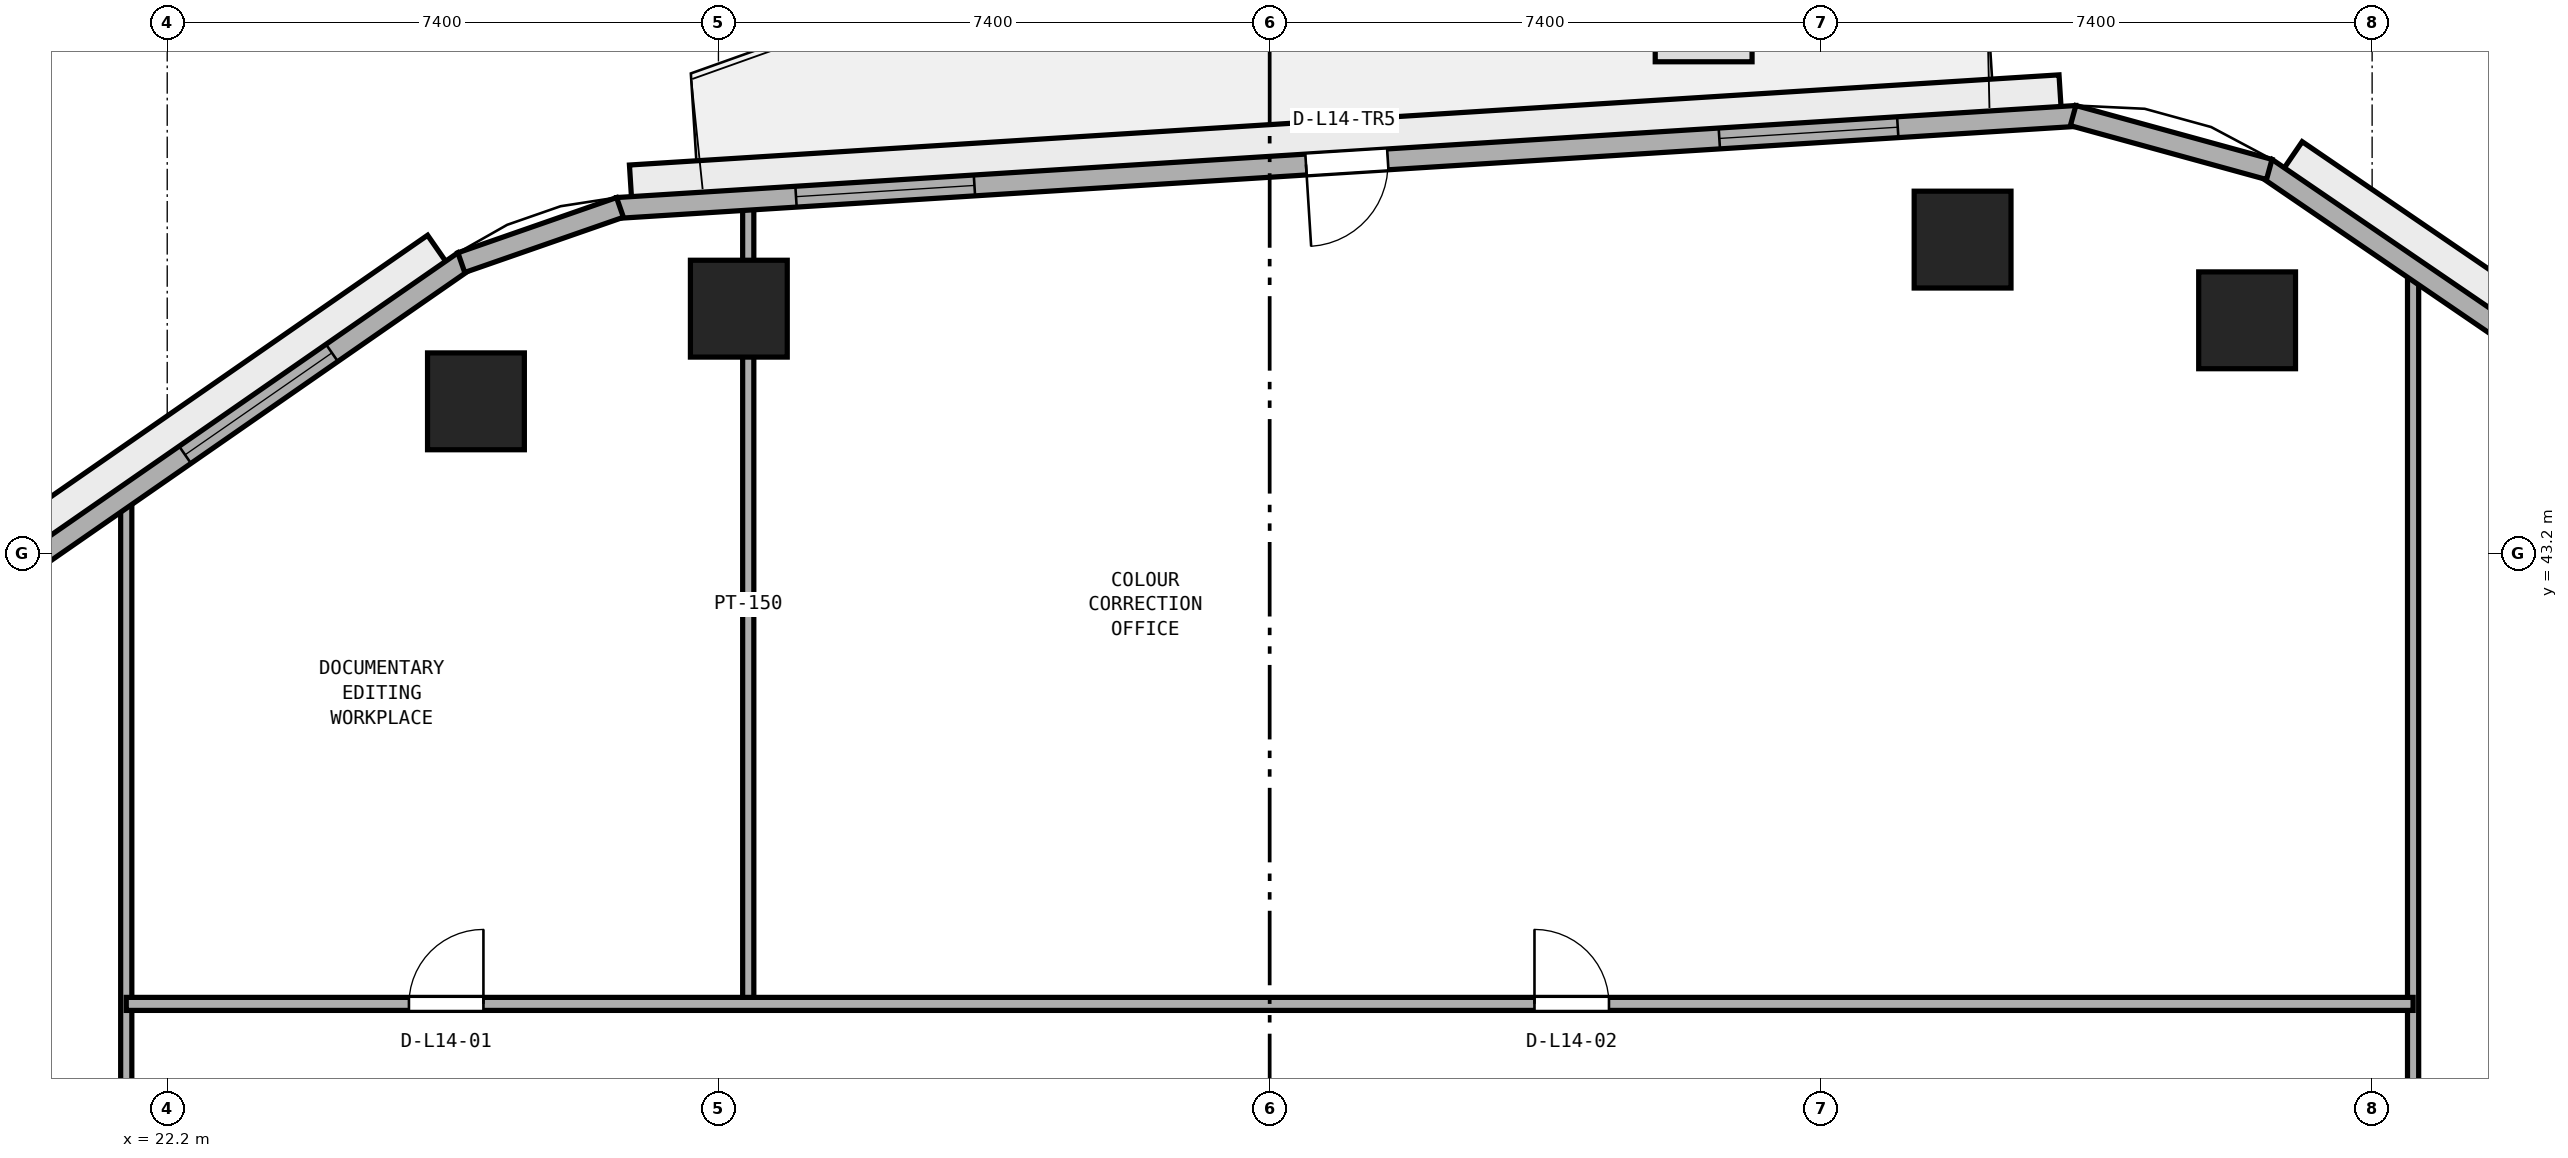
"""IFC4 building model, lengths in metres.
Left out: names, types, materials, properties, quantities, classifications, styles, units other than length and angle.
Written with IfcOpenShell. Run it as: python <this file> out.ifc"""

import sys

from ifc_helpers import new_model, si_unit, direction, frame, frame_2d, origin, origin_2d, place, context, subcontext, project, spatial, rectangle, extrude, element, fill, save


model = new_model("IFC4")
c1 = context("Model", 3, precision=1e-05, world=origin(), true_north=direction((0.0, 1.0)))
c2 = subcontext(c1, "Body", "Model", "MODEL_VIEW")
j1 = project(units=[si_unit("LENGTHUNIT", "METRE"), si_unit("PLANEANGLEUNIT", "RADIAN")], contexts=[c1])
p1 = place(None, origin())
s1 = spatial("IfcSite", under=j1, at=p1, CompositionType="ELEMENT")
p2 = place(p1, origin())
s2 = spatial("IfcBuilding", under=s1, at=p2, CompositionType="ELEMENT")
p3 = place(p2, frame((0.0, 0.0, 59.2)))
s3 = spatial("IfcBuildingStorey", under=s2, at=p3, CompositionType="ELEMENT", Elevation=59.2)
for number, where, z_axis, x_axis in (
    (1, (50.122, 46.326, 0.0), (0.0, 0.0, 1.0), (1.0, 0.0, 0.0)),
    (2, (46.302, 47.409, 0.0), (0.0, 0.0, 1.0), (1.0, 0.0, 0.0)),
    (3, (29.874, 46.482, 0.0), (0.0, 0.0, 1.0), (1.0, 0.0, 0.0)),
    (4, (26.344, 45.238, 0.0), (0.0, 0.0, 1.0), (1.0, 0.0, 0.0)),
):
    element("IfcColumn", number, at=place(p3, frame(where, z_axis=z_axis, x_axis=x_axis)), inside=s3, PredefinedType="COLUMN", context=c2, shape_type="SweptSolid", body=[
        extrude(rectangle(XDim=1.3, YDim=1.3, at=origin_2d()), origin(), (0.0, 0.0, 1.0), 3.8),
    ])
p4 = place(p3, frame((52.35, 3.611, 0.0), z_axis=(0.0, 0.0, 1.0), x_axis=(0.0, 1.0, 0.0)))
e5 = element("IfcWall", 5, at=p4, inside=s3, PredefinedType="PARTITIONING", context=c2, shape_type="SweptSolid", body=[
    extrude(rectangle(XDim=43.441, YDim=0.15, at=frame_2d((21.72, 0.0))), origin(), (0.0, 0.0, 1.0), 3.525),
])
p5 = place(p4, frame((12.364, 0.0, 0.0)))
e6 = element("IfcOpeningElement", 6, at=p5, cuts=e5, PredefinedType="OPENING", context=c2, shape_type="SweptSolid", body=[
    extrude(rectangle(XDim=0.9, YDim=2.1, at=frame_2d((0.45, 1.05))), frame((0.0, 0.085, 0.0), z_axis=(0.0, -1.0, 0.0), x_axis=(1.0, 0.0, 0.0)), (0.0, 0.0, 1.0), 0.17),
])
p6 = place(p4, frame((18.889, 0.0, 0.0)))
e7 = element("IfcOpeningElement", 7, at=p6, cuts=e5, PredefinedType="OPENING", context=c2, shape_type="SweptSolid", body=[
    extrude(rectangle(XDim=1.0, YDim=2.12, at=frame_2d((0.5, 1.06))), frame((0.0, 0.085, 0.0), z_axis=(0.0, -1.0, 0.0), x_axis=(1.0, 0.0, 0.0)), (0.0, 0.0, 1.0), 0.17),
])
p7 = place(p4, frame((25.689, 0.0, 0.0)))
e8 = element("IfcOpeningElement", 8, at=p7, cuts=e5, PredefinedType="OPENING", context=c2, shape_type="SweptSolid", body=[
    extrude(rectangle(XDim=1.0, YDim=2.12, at=frame_2d((0.5, 1.06))), frame((0.0, 0.085, 0.0), z_axis=(0.0, -1.0, 0.0), x_axis=(1.0, 0.0, 0.0)), (0.0, 0.0, 1.0), 0.17),
])
p8 = place(p4, frame((31.114, 0.0, 0.0)))
e9 = element("IfcOpeningElement", 9, at=p8, cuts=e5, PredefinedType="OPENING", context=c2, shape_type="SweptSolid", body=[
    extrude(rectangle(XDim=0.9, YDim=2.1, at=frame_2d((0.45, 1.05))), frame((0.0, 0.085, 0.0), z_axis=(0.0, -1.0, 0.0), x_axis=(1.0, 0.0, 0.0)), (0.0, 0.0, 1.0), 0.17),
])
p9 = place(p3, frame((30.0, 37.15, 0.0), z_axis=(0.0, 0.0, 1.0), x_axis=(0.0, 1.0, 0.0)))
e10 = element("IfcWall", 10, at=p9, inside=s3, PredefinedType="PARTITIONING", context=c2, shape_type="SweptSolid", body=[
    extrude(rectangle(XDim=10.73, YDim=0.15, at=frame_2d((5.365, 0.0))), origin(), (0.0, 0.0, 1.0), 2.908),
])
p10 = place(p3, frame((21.65, 6.119, 0.0), z_axis=(0.0, 0.0, 1.0), x_axis=(0.0, 1.0, 0.0)))
e11 = element("IfcWall", 11, at=p10, inside=s3, PredefinedType="PARTITIONING", context=c2, shape_type="SweptSolid", body=[
    extrude(rectangle(XDim=37.884, YDim=0.15, at=frame_2d((18.942, 0.0))), origin(), (0.0, 0.0, 1.0), 3.525),
])
p11 = place(p10, frame((13.556, 0.0, 0.0)))
e12 = element("IfcOpeningElement", 12, at=p11, cuts=e11, PredefinedType="OPENING", context=c2, shape_type="SweptSolid", body=[
    extrude(rectangle(XDim=0.9, YDim=2.1, at=frame_2d((0.45, 1.05))), frame((0.0, 0.085, 0.0), z_axis=(0.0, -1.0, 0.0), x_axis=(1.0, 0.0, 0.0)), (0.0, 0.0, 1.0), 0.17),
])
p12 = place(p10, frame((25.506, 0.0, 0.0)))
e13 = element("IfcOpeningElement", 13, at=p12, cuts=e11, PredefinedType="OPENING", context=c2, shape_type="SweptSolid", body=[
    extrude(rectangle(XDim=0.9, YDim=2.1, at=frame_2d((0.45, 1.05))), frame((0.0, 0.085, 0.0), z_axis=(0.0, -1.0, 0.0), x_axis=(1.0, 0.0, 0.0)), (0.0, 0.0, 1.0), 0.17),
])
p13 = place(p3, frame((21.65, 37.15, 0.0), z_axis=(0.0, 0.0, 1.0), x_axis=(1.0, 0.0, 0.0)))
e14 = element("IfcWall", 14, at=p13, inside=s3, PredefinedType="PARTITIONING", context=c2, shape_type="SweptSolid", body=[
    extrude(rectangle(XDim=30.7, YDim=0.175, at=frame_2d((15.35, 0.0))), origin(), (0.0, 0.0, 1.0), 3.525),
])
p14 = place(p13, frame((3.795, 0.0, 0.0)))
e15 = element("IfcOpeningElement", 15, at=p14, cuts=e14, PredefinedType="OPENING", context=c2, shape_type="SweptSolid", body=[
    extrude(rectangle(XDim=1.0, YDim=2.12, at=frame_2d((0.5, 1.06))), frame((0.0, 0.097, 0.0), z_axis=(0.0, -1.0, 0.0), x_axis=(1.0, 0.0, 0.0)), (0.0, 0.0, 1.0), 0.195),
])
p15 = place(p13, frame((18.905, 0.0, 0.0)))
e16 = element("IfcOpeningElement", 16, at=p15, cuts=e14, PredefinedType="OPENING", context=c2, shape_type="SweptSolid", body=[
    extrude(rectangle(XDim=1.0, YDim=2.12, at=frame_2d((0.5, 1.06))), frame((0.0, 0.097, 0.0), z_axis=(0.0, -1.0, 0.0), x_axis=(1.0, 0.0, 0.0)), (0.0, 0.0, 1.0), 0.195),
])
p16 = place(p3, frame((64.29, 38.867, 0.0), z_axis=(0.0, 0.0, 1.0), x_axis=(-0.825755550159, 0.564028165416, 0.0)))
e17 = element("IfcWall", 17, at=p16, inside=s3, PredefinedType="STANDARD", context=c2, shape_type="SweptSolid", body=[
    extrude(rectangle(XDim=16.848, YDim=0.28, at=frame_2d((8.424, 0.0))), origin(), (0.0, 0.0, 1.0), 3.525),
])
p17 = place(p16, frame((1.941, 0.0, 0.9)))
e18 = element("IfcOpeningElement", 18, at=p17, cuts=e17, PredefinedType="OPENING", context=c2, shape_type="SweptSolid", body=[
    extrude(rectangle(XDim=2.4, YDim=1.75, at=frame_2d((1.2, 0.875))), frame((0.0, 0.15, 0.0), z_axis=(0.0, -1.0, 0.0), x_axis=(1.0, 0.0, 0.0)), (0.0, 0.0, 1.0), 0.3),
])
p18 = place(p16, frame((7.224, 0.0, 0.9)))
e19 = element("IfcOpeningElement", 19, at=p18, cuts=e17, PredefinedType="OPENING", context=c2, shape_type="SweptSolid", body=[
    extrude(rectangle(XDim=2.4, YDim=1.75, at=frame_2d((1.2, 0.875))), frame((0.0, 0.15, 0.0), z_axis=(0.0, -1.0, 0.0), x_axis=(1.0, 0.0, 0.0)), (0.0, 0.0, 1.0), 0.3),
])
p19 = place(p3, frame((47.832, 49.069, 0.0), z_axis=(0.0, 0.0, 1.0), x_axis=(-0.998017725054, -0.062933460723, 0.0)))
e20 = element("IfcWall", 20, at=p19, inside=s3, PredefinedType="STANDARD", context=c2, shape_type="SweptSolid", body=[
    extrude(rectangle(XDim=19.629, YDim=0.28, at=frame_2d((9.815, 0.0))), origin(), (0.0, 0.0, 1.0), 3.525),
])
p20 = place(p19, frame((9.265, 0.0, 0.0)))
e21 = element("IfcOpeningElement", 21, at=p20, cuts=e20, PredefinedType="OPENING", context=c2, shape_type="SweptSolid", body=[
    extrude(rectangle(XDim=1.1, YDim=2.2, at=frame_2d((0.55, 1.1))), frame((0.0, 0.15, 0.0), z_axis=(0.0, -1.0, 0.0), x_axis=(1.0, 0.0, 0.0)), (0.0, 0.0, 1.0), 0.3),
])
p21 = place(p19, frame((2.405, 0.0, 0.9)))
e22 = element("IfcOpeningElement", 22, at=p21, cuts=e20, PredefinedType="OPENING", context=c2, shape_type="SweptSolid", body=[
    extrude(rectangle(XDim=2.4, YDim=1.75, at=frame_2d((1.2, 0.875))), frame((0.0, 0.15, 0.0), z_axis=(0.0, -1.0, 0.0), x_axis=(1.0, 0.0, 0.0)), (0.0, 0.0, 1.0), 0.3),
])
p22 = place(p19, frame((14.825, 0.0, 0.9)))
e23 = element("IfcOpeningElement", 23, at=p22, cuts=e20, PredefinedType="OPENING", context=c2, shape_type="SweptSolid", body=[
    extrude(rectangle(XDim=2.4, YDim=1.75, at=frame_2d((1.2, 0.875))), frame((0.0, 0.15, 0.0), z_axis=(0.0, -1.0, 0.0), x_axis=(1.0, 0.0, 0.0)), (0.0, 0.0, 1.0), 0.3),
])
p23 = place(p3, frame((26.182, 47.118, 0.0), z_axis=(0.0, 0.0, 1.0), x_axis=(-0.821547956627, -0.570139417127, 0.0)))
e24 = element("IfcWall", 24, at=p23, inside=s3, PredefinedType="STANDARD", context=c2, shape_type="SweptSolid", body=[
    extrude(rectangle(XDim=18.132, YDim=0.28, at=frame_2d((9.066, 0.0))), origin(), (0.0, 0.0, 1.0), 3.525),
])
p24 = place(p23, frame((2.156, 0.0, 0.9)))
e25 = element("IfcOpeningElement", 25, at=p24, cuts=e24, PredefinedType="OPENING", context=c2, shape_type="SweptSolid", body=[
    extrude(rectangle(XDim=2.4, YDim=1.75, at=frame_2d((1.2, 0.875))), frame((0.0, 0.15, 0.0), z_axis=(0.0, -1.0, 0.0), x_axis=(1.0, 0.0, 0.0)), (0.0, 0.0, 1.0), 0.3),
])
p25 = place(p23, frame((7.866, 0.0, 0.9)))
e26 = element("IfcOpeningElement", 26, at=p25, cuts=e24, PredefinedType="OPENING", context=c2, shape_type="SweptSolid", body=[
    extrude(rectangle(XDim=2.4, YDim=1.75, at=frame_2d((1.2, 0.875))), frame((0.0, 0.15, 0.0), z_axis=(0.0, -1.0, 0.0), x_axis=(1.0, 0.0, 0.0)), (0.0, 0.0, 1.0), 0.3),
])
p26 = place(p23, frame((13.577, 0.0, 0.9)))
e27 = element("IfcOpeningElement", 27, at=p26, cuts=e24, PredefinedType="OPENING", context=c2, shape_type="SweptSolid", body=[
    extrude(rectangle(XDim=2.4, YDim=1.75, at=frame_2d((1.2, 0.875))), frame((0.0, 0.15, 0.0), z_axis=(0.0, -1.0, 0.0), x_axis=(1.0, 0.0, 0.0)), (0.0, 0.0, 1.0), 0.3),
])
p27 = place(p3, frame((50.419, 48.351, 0.0), z_axis=(0.0, 0.0, 1.0), x_axis=(-0.964254516967, 0.264977784933, 0.0)))
e28 = element("IfcWall", 28, at=p27, inside=s3, PredefinedType="STANDARD", context=c2, shape_type="SweptSolid", body=[
    extrude(rectangle(XDim=2.731, YDim=0.28, at=frame_2d((1.365, 0.0))), origin(), (0.0, 0.0, 1.0), 3.525),
])
p28 = place(p3, frame((28.278, 47.842, 0.0), z_axis=(0.0, 0.0, 1.0), x_axis=(-0.9444559001, -0.328638179106, 0.0)))
e29 = element("IfcWall", 29, at=p28, inside=s3, PredefinedType="STANDARD", context=c2, shape_type="SweptSolid", body=[
    extrude(rectangle(XDim=2.255, YDim=0.28, at=frame_2d((1.128, 0.0))), origin(), (0.0, 0.0, 1.0), 3.525),
])
p29 = place(p14, origin())
e30 = element("IfcDoor", 30, at=p29, inside=s3, OperationType="SINGLE_SWING_RIGHT", PredefinedType="DOOR", context=c2, shape_type="SweptSolid", body=[
    extrude(rectangle(XDim=1.0, YDim=2.12, at=frame_2d((0.5, 1.06))), frame((0.0, 0.025, 0.0), z_axis=(0.0, -1.0, 0.0), x_axis=(1.0, 0.0, 0.0)), (0.0, 0.0, 1.0), 0.05),
])
fill(e15, e30)
p30 = place(p15, origin())
e31 = element("IfcDoor", 31, at=p30, inside=s3, OperationType="SINGLE_SWING_LEFT", PredefinedType="DOOR", context=c2, shape_type="SweptSolid", body=[
    extrude(rectangle(XDim=1.0, YDim=2.12, at=frame_2d((0.5, 1.06))), frame((0.0, 0.025, 0.0), z_axis=(0.0, -1.0, 0.0), x_axis=(1.0, 0.0, 0.0)), (0.0, 0.0, 1.0), 0.05),
])
fill(e16, e31)
p31 = place(p20, origin())
e32 = element("IfcDoor", 32, at=p31, inside=s3, OperationType="SINGLE_SWING_RIGHT", PredefinedType="DOOR", context=c2, shape_type="SweptSolid", body=[
    extrude(rectangle(XDim=1.1, YDim=2.2, at=frame_2d((0.55, 1.1))), frame((0.0, 0.025, 0.0), z_axis=(0.0, -1.0, 0.0), x_axis=(1.0, 0.0, 0.0)), (0.0, 0.0, 1.0), 0.05),
])
fill(e21, e32)
p32 = place(p21, origin())
e33 = element("IfcWindow", 33, at=p32, inside=s3, PartitioningType="SINGLE_PANEL", PredefinedType="WINDOW", context=c2, shape_type="SweptSolid", body=[
    extrude(rectangle(XDim=2.4, YDim=1.75, at=frame_2d((1.2, 0.875))), frame((0.0, 0.03, 0.0), z_axis=(0.0, -1.0, 0.0), x_axis=(1.0, 0.0, 0.0)), (0.0, 0.0, 1.0), 0.06),
])
fill(e22, e33)
p33 = place(p22, origin())
e34 = element("IfcWindow", 34, at=p33, inside=s3, PartitioningType="SINGLE_PANEL", PredefinedType="WINDOW", context=c2, shape_type="SweptSolid", body=[
    extrude(rectangle(XDim=2.4, YDim=1.75, at=frame_2d((1.2, 0.875))), frame((0.0, 0.03, 0.0), z_axis=(0.0, -1.0, 0.0), x_axis=(1.0, 0.0, 0.0)), (0.0, 0.0, 1.0), 0.06),
])
fill(e23, e34)
p34 = place(p24, origin())
e35 = element("IfcWindow", 35, at=p34, inside=s3, PartitioningType="SINGLE_PANEL", PredefinedType="WINDOW", context=c2, shape_type="SweptSolid", body=[
    extrude(rectangle(XDim=2.4, YDim=1.75, at=frame_2d((1.2, 0.875))), frame((0.0, 0.03, 0.0), z_axis=(0.0, -1.0, 0.0), x_axis=(1.0, 0.0, 0.0)), (0.0, 0.0, 1.0), 0.06),
])
fill(e25, e35)
save(model, sys.argv[1])
